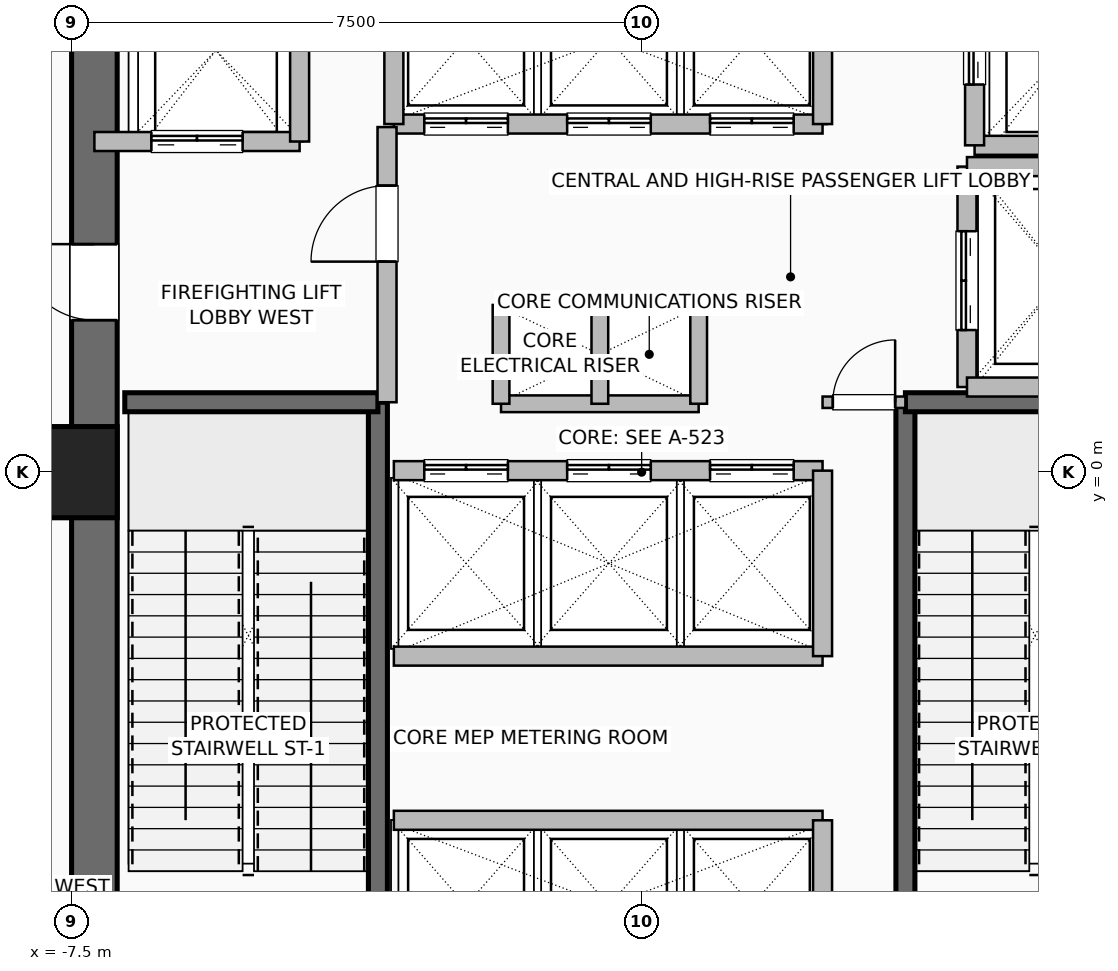
"""IFC4 building model, lengths in metres.
Left out: names, types, materials, properties, quantities, classifications, styles, units other than length and angle.
Written with IfcOpenShell. Run it as: python <this file> out.ifc"""

import sys

from ifc_helpers import new_model, si_unit, direction, frame, frame_2d, origin, origin_2d, place, context, subcontext, project, spatial, rectangle, hollow_rectangle, extrude, element, fill, save


model = new_model("IFC4")
c1 = context("Model", 3, precision=1e-05, world=origin(), true_north=direction((0.0, 1.0)))
c2 = subcontext(c1, "Body", "Model", "MODEL_VIEW")
j1 = project(units=[si_unit("LENGTHUNIT", "METRE"), si_unit("PLANEANGLEUNIT", "RADIAN")], contexts=[c1])
p1 = place(None, origin())
s1 = spatial("IfcSite", under=j1, at=p1, CompositionType="ELEMENT")
p2 = place(p1, origin())
s2 = spatial("IfcBuilding", under=s1, at=p2, CompositionType="ELEMENT")
p3 = place(p2, frame((0.0, 0.0, 88.0)))
s3 = spatial("IfcBuildingStorey", under=s2, at=p3, CompositionType="ELEMENT", Elevation=88.0)
p4 = place(p3, frame((-7.5, 0.0, 0.0), z_axis=(0.0, 0.0, 1.0), x_axis=(1.0, 0.0, 0.0)))
e1 = element("IfcColumn", 1, at=p4, inside=s3, PredefinedType="COLUMN", context=c2, shape_type="SweptSolid", body=[
    extrude(hollow_rectangle(XDim=1.2, YDim=1.2, WallThickness=0.055, at=origin_2d()), origin(), (0.0, 0.0, 1.0), 6.0),
])
p5 = place(p3, frame((-7.2, -7.5, 0.0), z_axis=(0.0, 0.0, 1.0), x_axis=(0.0, 1.0, 0.0)))
e2 = element("IfcWall", 2, at=p5, inside=s3, PredefinedType="SHEAR", context=c2, shape_type="SweptSolid", body=[
    extrude(rectangle(XDim=15.0, YDim=0.6, at=frame_2d((7.5, 0.0))), origin(), (0.0, 0.0, 1.0), 5.6),
])
p6 = place(p5, frame((9.5, 0.0, 0.0)))
e3 = element("IfcOpeningElement", 3, at=p6, cuts=e2, PredefinedType="OPENING", context=c2, shape_type="SweptSolid", body=[
    extrude(rectangle(XDim=1.0, YDim=2.08, at=frame_2d((0.5, 1.04))), frame((0.0, 0.31, 0.0), z_axis=(0.0, -1.0, 0.0), x_axis=(1.0, 0.0, 0.0)), (0.0, 0.0, 1.0), 0.62),
])
p7 = place(p3, frame((-3.47, -6.8, 0.0), z_axis=(0.0, 0.0, 1.0), x_axis=(0.0, 1.0, 0.0)))
e4 = element("IfcWall", 4, at=p7, inside=s3, PredefinedType="SHEAR", context=c2, shape_type="SweptSolid", body=[
    extrude(rectangle(XDim=7.72, YDim=0.25, at=frame_2d((3.86, 0.0))), origin(), (0.0, 0.0, 1.0), 5.6),
])
p8 = place(p3, frame((-6.8, 0.92, 0.0), z_axis=(0.0, 0.0, 1.0), x_axis=(1.0, 0.0, 0.0)))
e5 = element("IfcWall", 5, at=p8, inside=s3, PredefinedType="SHEAR", context=c2, shape_type="SweptSolid", body=[
    extrude(rectangle(XDim=3.33, YDim=0.25, at=frame_2d((1.665, 0.0))), origin(), (0.0, 0.0, 1.0), 5.6),
])
p9 = place(p3, frame((3.47, -6.8, 0.0), z_axis=(0.0, 0.0, 1.0), x_axis=(0.0, 1.0, 0.0)))
e6 = element("IfcWall", 6, at=p9, inside=s3, PredefinedType="SHEAR", context=c2, shape_type="SweptSolid", body=[
    extrude(rectangle(XDim=7.72, YDim=0.25, at=frame_2d((3.86, 0.0))), origin(), (0.0, 0.0, 1.0), 5.6),
])
p10 = place(p3, frame((3.47, 0.92, 0.0), z_axis=(0.0, 0.0, 1.0), x_axis=(1.0, 0.0, 0.0)))
e7 = element("IfcWall", 7, at=p10, inside=s3, PredefinedType="SHEAR", context=c2, shape_type="SweptSolid", body=[
    extrude(rectangle(XDim=3.33, YDim=0.25, at=frame_2d((1.665, 0.0))), origin(), (0.0, 0.0, 1.0), 5.6),
])
for number, where, z_axis, x_axis in (
    (8, (-1.85, 2.2, 0.0), (0.0, 0.0, 1.0), (1.0, 0.0, 0.0)),
    (9, (-1.85, 0.9, 0.0), (0.0, 0.0, 1.0), (1.0, 0.0, 0.0)),
):
    element("IfcWall", number, at=place(p3, frame(where, z_axis=z_axis, x_axis=x_axis)), inside=s3, PredefinedType="PARTITIONING", context=c2, shape_type="SweptSolid", body=[
        extrude(rectangle(XDim=2.6, YDim=0.22, at=frame_2d((1.3, 0.0))), origin(), (0.0, 0.0, 1.0), 5.6),
    ])
for number, where, z_axis, x_axis in (
    (10, (-0.55, 0.9, 0.0), (0.0, 0.0, 1.0), (0.0, 1.0, 0.0)),
    (11, (0.75, 0.9, 0.0), (0.0, 0.0, 1.0), (0.0, 1.0, 0.0)),
    (12, (-1.85, 0.9, 0.0), (0.0, 0.0, 1.0), (0.0, 1.0, 0.0)),
):
    element("IfcWall", number, at=place(p3, frame(where, z_axis=z_axis, x_axis=x_axis)), inside=s3, PredefinedType="PARTITIONING", context=c2, shape_type="SweptSolid", body=[
        extrude(rectangle(XDim=1.3, YDim=0.22, at=frame_2d((0.65, 0.0))), origin(), (0.0, 0.0, 1.0), 5.6),
    ])
p11 = place(p3, frame((-3.26, -4.58, 0.0), z_axis=(0.0, 0.0, 1.0), x_axis=(1.0, 0.0, 0.0)))
e13 = element("IfcWall", 13, at=p11, inside=s3, PredefinedType="SHEAR", context=c2, shape_type="SweptSolid", body=[
    extrude(rectangle(XDim=5.64, YDim=0.25, at=frame_2d((2.82, 0.0))), origin(), (0.0, 0.0, 1.0), 5.6),
])
p12 = place(p3, frame((2.38, -6.8, 0.0), z_axis=(0.0, 0.0, 1.0), x_axis=(0.0, 1.0, 0.0)))
e14 = element("IfcWall", 14, at=p12, inside=s3, PredefinedType="SHEAR", context=c2, shape_type="SweptSolid", body=[
    extrude(rectangle(XDim=2.22, YDim=0.25, at=frame_2d((1.11, 0.0))), origin(), (0.0, 0.0, 1.0), 5.6),
])
p13 = place(p3, frame((-3.26, 0.02, 0.0), z_axis=(0.0, 0.0, 1.0), x_axis=(1.0, 0.0, 0.0)))
e15 = element("IfcWall", 15, at=p13, inside=s3, PredefinedType="SHEAR", context=c2, shape_type="SweptSolid", body=[
    extrude(rectangle(XDim=5.64, YDim=0.25, at=frame_2d((2.82, 0.0))), origin(), (0.0, 0.0, 1.0), 5.6),
])
p14 = place(p13, frame((0.4, 0.0, 0.0)))
e16 = element("IfcOpeningElement", 16, at=p14, cuts=e15, PredefinedType="OPENING", context=c2, shape_type="SweptSolid", body=[
    extrude(rectangle(XDim=1.1, YDim=2.2, at=frame_2d((0.55, 1.1))), frame((0.0, 0.135, 0.0), z_axis=(0.0, -1.0, 0.0), x_axis=(1.0, 0.0, 0.0)), (0.0, 0.0, 1.0), 0.27),
])
p15 = place(p13, frame((2.28, 0.0, 0.0)))
e17 = element("IfcOpeningElement", 17, at=p15, cuts=e15, PredefinedType="OPENING", context=c2, shape_type="SweptSolid", body=[
    extrude(rectangle(XDim=1.1, YDim=2.2, at=frame_2d((0.55, 1.1))), frame((0.0, 0.135, 0.0), z_axis=(0.0, -1.0, 0.0), x_axis=(1.0, 0.0, 0.0)), (0.0, 0.0, 1.0), 0.27),
])
p16 = place(p13, frame((4.16, 0.0, 0.0)))
e18 = element("IfcOpeningElement", 18, at=p16, cuts=e15, PredefinedType="OPENING", context=c2, shape_type="SweptSolid", body=[
    extrude(rectangle(XDim=1.1, YDim=2.2, at=frame_2d((0.55, 1.1))), frame((0.0, 0.135, 0.0), z_axis=(0.0, -1.0, 0.0), x_axis=(1.0, 0.0, 0.0)), (0.0, 0.0, 1.0), 0.27),
])
p17 = place(p3, frame((-3.26, -2.42, 0.0), z_axis=(0.0, 0.0, 1.0), x_axis=(1.0, 0.0, 0.0)))
e19 = element("IfcWall", 19, at=p17, inside=s3, PredefinedType="SHEAR", context=c2, shape_type="SweptSolid", body=[
    extrude(rectangle(XDim=5.64, YDim=0.25, at=frame_2d((2.82, 0.0))), origin(), (0.0, 0.0, 1.0), 5.6),
])
p18 = place(p3, frame((2.38, -2.42, 0.0), z_axis=(0.0, 0.0, 1.0), x_axis=(0.0, 1.0, 0.0)))
e20 = element("IfcWall", 20, at=p18, inside=s3, PredefinedType="SHEAR", context=c2, shape_type="SweptSolid", body=[
    extrude(rectangle(XDim=2.44, YDim=0.25, at=frame_2d((1.22, 0.0))), origin(), (0.0, 0.0, 1.0), 5.6),
])
p19 = place(p3, frame((-3.26, 4.58, 0.0), z_axis=(0.0, 0.0, 1.0), x_axis=(1.0, 0.0, 0.0)))
e21 = element("IfcWall", 21, at=p19, inside=s3, PredefinedType="SHEAR", context=c2, shape_type="SweptSolid", body=[
    extrude(rectangle(XDim=5.64, YDim=0.25, at=frame_2d((2.82, 0.0))), origin(), (0.0, 0.0, 1.0), 5.6),
])
p20 = place(p19, frame((0.4, 0.0, 0.0)))
e22 = element("IfcOpeningElement", 22, at=p20, cuts=e21, PredefinedType="OPENING", context=c2, shape_type="SweptSolid", body=[
    extrude(rectangle(XDim=1.1, YDim=2.2, at=frame_2d((0.55, 1.1))), frame((0.0, 0.135, 0.0), z_axis=(0.0, -1.0, 0.0), x_axis=(1.0, 0.0, 0.0)), (0.0, 0.0, 1.0), 0.27),
])
p21 = place(p19, frame((2.28, 0.0, 0.0)))
e23 = element("IfcOpeningElement", 23, at=p21, cuts=e21, PredefinedType="OPENING", context=c2, shape_type="SweptSolid", body=[
    extrude(rectangle(XDim=1.1, YDim=2.2, at=frame_2d((0.55, 1.1))), frame((0.0, 0.135, 0.0), z_axis=(0.0, -1.0, 0.0), x_axis=(1.0, 0.0, 0.0)), (0.0, 0.0, 1.0), 0.27),
])
p22 = place(p19, frame((4.16, 0.0, 0.0)))
e24 = element("IfcOpeningElement", 24, at=p22, cuts=e21, PredefinedType="OPENING", context=c2, shape_type="SweptSolid", body=[
    extrude(rectangle(XDim=1.1, YDim=2.2, at=frame_2d((0.55, 1.1))), frame((0.0, 0.135, 0.0), z_axis=(0.0, -1.0, 0.0), x_axis=(1.0, 0.0, 0.0)), (0.0, 0.0, 1.0), 0.27),
])
for number, where, z_axis, x_axis in (
    (25, (-3.26, 4.58, 0.0), (0.0, 0.0, 1.0), (0.0, 1.0, 0.0)),
    (26, (2.38, 4.58, 0.0), (0.0, 0.0, 1.0), (0.0, 1.0, 0.0)),
):
    element("IfcWall", number, at=place(p3, frame(where, z_axis=z_axis, x_axis=x_axis)), inside=s3, PredefinedType="SHEAR", context=c2, shape_type="SweptSolid", body=[
        extrude(rectangle(XDim=2.22, YDim=0.25, at=frame_2d((1.11, 0.0))), origin(), (0.0, 0.0, 1.0), 5.6),
    ])
p23 = place(p3, frame((-7.2, 4.35, 0.0), z_axis=(0.0, 0.0, 1.0), x_axis=(1.0, 0.0, 0.0)))
e27 = element("IfcWall", 27, at=p23, inside=s3, PredefinedType="SHEAR", context=c2, shape_type="SweptSolid", body=[
    extrude(rectangle(XDim=2.7, YDim=0.25, at=frame_2d((1.35, 0.0))), origin(), (0.0, 0.0, 1.0), 5.6),
])
p24 = place(p23, frame((0.75, 0.0, 0.0)))
e28 = element("IfcOpeningElement", 28, at=p24, cuts=e27, PredefinedType="OPENING", context=c2, shape_type="SweptSolid", body=[
    extrude(rectangle(XDim=1.2, YDim=2.2, at=frame_2d((0.6, 1.1))), frame((0.0, 0.135, 0.0), z_axis=(0.0, -1.0, 0.0), x_axis=(1.0, 0.0, 0.0)), (0.0, 0.0, 1.0), 0.27),
])
p25 = place(p3, frame((-4.5, 4.35, 0.0), z_axis=(0.0, 0.0, 1.0), x_axis=(0.0, 1.0, 0.0)))
e29 = element("IfcWall", 29, at=p25, inside=s3, PredefinedType="SHEAR", context=c2, shape_type="SweptSolid", body=[
    extrude(rectangle(XDim=2.85, YDim=0.25, at=frame_2d((1.425, 0.0))), origin(), (0.0, 0.0, 1.0), 5.6),
])
p26 = place(p3, frame((4.38, 4.3, 0.0), z_axis=(0.0, 0.0, 1.0), x_axis=(1.0, 0.0, 0.0)))
e30 = element("IfcWall", 30, at=p26, inside=s3, PredefinedType="SHEAR", context=c2, shape_type="SweptSolid", body=[
    extrude(rectangle(XDim=2.42, YDim=0.25, at=frame_2d((1.21, 0.0))), origin(), (0.0, 0.0, 1.0), 5.6),
])
p27 = place(p3, frame((4.38, 4.3, 0.0), z_axis=(0.0, 0.0, 1.0), x_axis=(0.0, 1.0, 0.0)))
e31 = element("IfcWall", 31, at=p27, inside=s3, PredefinedType="SHEAR", context=c2, shape_type="SweptSolid", body=[
    extrude(rectangle(XDim=2.5, YDim=0.25, at=frame_2d((1.25, 0.0))), origin(), (0.0, 0.0, 1.0), 5.6),
])
p28 = place(p27, frame((0.8, 0.0, 0.0)))
e32 = element("IfcOpeningElement", 32, at=p28, cuts=e31, PredefinedType="OPENING", context=c2, shape_type="SweptSolid", body=[
    extrude(rectangle(XDim=1.2, YDim=2.2, at=frame_2d((0.6, 1.1))), frame((0.0, 0.135, 0.0), z_axis=(0.0, -1.0, 0.0), x_axis=(1.0, 0.0, 0.0)), (0.0, 0.0, 1.0), 0.27),
])
p29 = place(p3, frame((4.28, 1.12, 0.0), z_axis=(0.0, 0.0, 1.0), x_axis=(0.0, 1.0, 0.0)))
e33 = element("IfcWall", 33, at=p29, inside=s3, PredefinedType="SHEAR", context=c2, shape_type="SweptSolid", body=[
    extrude(rectangle(XDim=2.9, YDim=0.25, at=frame_2d((1.45, 0.0))), origin(), (0.0, 0.0, 1.0), 5.6),
])
p30 = place(p29, frame((0.75, 0.0, 0.0)))
e34 = element("IfcOpeningElement", 34, at=p30, cuts=e33, PredefinedType="OPENING", context=c2, shape_type="SweptSolid", body=[
    extrude(rectangle(XDim=1.3, YDim=2.3, at=frame_2d((0.65, 1.15))), frame((0.0, 0.135, 0.0), z_axis=(0.0, -1.0, 0.0), x_axis=(1.0, 0.0, 0.0)), (0.0, 0.0, 1.0), 0.27),
])
for number, where, z_axis, x_axis in (
    (35, (4.28, 1.12, 0.0), (0.0, 0.0, 1.0), (1.0, 0.0, 0.0)),
    (36, (4.28, 4.02, 0.0), (0.0, 0.0, 1.0), (1.0, 0.0, 0.0)),
):
    element("IfcWall", number, at=place(p3, frame(where, z_axis=z_axis, x_axis=x_axis)), inside=s3, PredefinedType="SHEAR", context=c2, shape_type="SweptSolid", body=[
        extrude(rectangle(XDim=2.52, YDim=0.25, at=frame_2d((1.26, 0.0))), origin(), (0.0, 0.0, 1.0), 5.6),
    ])
p31 = place(p3, frame((-3.35, 0.92, 0.0), z_axis=(0.0, 0.0, 1.0), x_axis=(0.0, 1.0, 0.0)))
e37 = element("IfcWall", 37, at=p31, inside=s3, PredefinedType="SHEAR", context=c2, shape_type="SweptSolid", body=[
    extrude(rectangle(XDim=3.62, YDim=0.25, at=frame_2d((1.81, 0.0))), origin(), (0.0, 0.0, 1.0), 5.6),
])
p32 = place(p31, frame((1.85, 0.0, 0.0)))
e38 = element("IfcOpeningElement", 38, at=p32, cuts=e37, PredefinedType="OPENING", context=c2, shape_type="SweptSolid", body=[
    extrude(rectangle(XDim=1.0, YDim=2.08, at=frame_2d((0.5, 1.04))), frame((0.0, 0.135, 0.0), z_axis=(0.0, -1.0, 0.0), x_axis=(1.0, 0.0, 0.0)), (0.0, 0.0, 1.0), 0.27),
])
p33 = place(p3, frame((2.38, 0.92, 0.0), z_axis=(0.0, 0.0, 1.0), x_axis=(1.0, 0.0, 0.0)))
e39 = element("IfcWall", 39, at=p33, inside=s3, PredefinedType="PARTITIONING", context=c2, shape_type="SweptSolid", body=[
    extrude(rectangle(XDim=1.09, YDim=0.15, at=frame_2d((0.545, 0.0))), origin(), (0.0, 0.0, 1.0), 5.6),
])
p34 = place(p33, frame((0.135, 0.0, 0.0)))
e40 = element("IfcOpeningElement", 40, at=p34, cuts=e39, PredefinedType="OPENING", context=c2, shape_type="SweptSolid", body=[
    extrude(rectangle(XDim=0.82, YDim=2.05, at=frame_2d((0.41, 1.025))), frame((0.0, 0.085, 0.0), z_axis=(0.0, -1.0, 0.0), x_axis=(1.0, 0.0, 0.0)), (0.0, 0.0, 1.0), 0.17),
])
p35 = place(p6, origin())
e41 = element("IfcDoor", 41, at=p35, inside=s3, OperationType="SINGLE_SWING_RIGHT", PredefinedType="DOOR", context=c2, shape_type="SweptSolid", body=[
    extrude(rectangle(XDim=1.0, YDim=2.08, at=frame_2d((0.5, 1.04))), frame((0.0, 0.025, 0.0), z_axis=(0.0, -1.0, 0.0), x_axis=(1.0, 0.0, 0.0)), (0.0, 0.0, 1.0), 0.05),
])
fill(e3, e41)
p36 = place(p14, origin())
e42 = element("IfcDoor", 42, at=p36, inside=s3, OperationType="DOUBLE_DOOR_SLIDING", PredefinedType="DOOR", context=c2, shape_type="SweptSolid", body=[
    extrude(rectangle(XDim=1.1, YDim=2.2, at=frame_2d((0.55, 1.1))), frame((0.0, 0.025, 0.0), z_axis=(0.0, -1.0, 0.0), x_axis=(1.0, 0.0, 0.0)), (0.0, 0.0, 1.0), 0.05),
])
fill(e16, e42)
p37 = place(p15, origin())
e43 = element("IfcDoor", 43, at=p37, inside=s3, OperationType="DOUBLE_DOOR_SLIDING", PredefinedType="DOOR", context=c2, shape_type="SweptSolid", body=[
    extrude(rectangle(XDim=1.1, YDim=2.2, at=frame_2d((0.55, 1.1))), frame((0.0, 0.025, 0.0), z_axis=(0.0, -1.0, 0.0), x_axis=(1.0, 0.0, 0.0)), (0.0, 0.0, 1.0), 0.05),
])
fill(e17, e43)
p38 = place(p16, origin())
e44 = element("IfcDoor", 44, at=p38, inside=s3, OperationType="DOUBLE_DOOR_SLIDING", PredefinedType="DOOR", context=c2, shape_type="SweptSolid", body=[
    extrude(rectangle(XDim=1.1, YDim=2.2, at=frame_2d((0.55, 1.1))), frame((0.0, 0.025, 0.0), z_axis=(0.0, -1.0, 0.0), x_axis=(1.0, 0.0, 0.0)), (0.0, 0.0, 1.0), 0.05),
])
fill(e18, e44)
p39 = place(p20, origin())
e45 = element("IfcDoor", 45, at=p39, inside=s3, OperationType="DOUBLE_DOOR_SLIDING", PredefinedType="DOOR", context=c2, shape_type="SweptSolid", body=[
    extrude(rectangle(XDim=1.1, YDim=2.2, at=frame_2d((0.55, 1.1))), frame((0.0, 0.025, 0.0), z_axis=(0.0, -1.0, 0.0), x_axis=(1.0, 0.0, 0.0)), (0.0, 0.0, 1.0), 0.05),
])
fill(e22, e45)
p40 = place(p21, origin())
e46 = element("IfcDoor", 46, at=p40, inside=s3, OperationType="DOUBLE_DOOR_SLIDING", PredefinedType="DOOR", context=c2, shape_type="SweptSolid", body=[
    extrude(rectangle(XDim=1.1, YDim=2.2, at=frame_2d((0.55, 1.1))), frame((0.0, 0.025, 0.0), z_axis=(0.0, -1.0, 0.0), x_axis=(1.0, 0.0, 0.0)), (0.0, 0.0, 1.0), 0.05),
])
fill(e23, e46)
p41 = place(p22, origin())
e47 = element("IfcDoor", 47, at=p41, inside=s3, OperationType="DOUBLE_DOOR_SLIDING", PredefinedType="DOOR", context=c2, shape_type="SweptSolid", body=[
    extrude(rectangle(XDim=1.1, YDim=2.2, at=frame_2d((0.55, 1.1))), frame((0.0, 0.025, 0.0), z_axis=(0.0, -1.0, 0.0), x_axis=(1.0, 0.0, 0.0)), (0.0, 0.0, 1.0), 0.05),
])
fill(e24, e47)
p42 = place(p24, origin())
e48 = element("IfcDoor", 48, at=p42, inside=s3, OperationType="DOUBLE_DOOR_SLIDING", PredefinedType="DOOR", context=c2, shape_type="SweptSolid", body=[
    extrude(rectangle(XDim=1.2, YDim=2.2, at=frame_2d((0.6, 1.1))), frame((0.0, 0.025, 0.0), z_axis=(0.0, -1.0, 0.0), x_axis=(1.0, 0.0, 0.0)), (0.0, 0.0, 1.0), 0.05),
])
fill(e28, e48)
p43 = place(p28, origin())
e49 = element("IfcDoor", 49, at=p43, inside=s3, OperationType="DOUBLE_DOOR_SLIDING", PredefinedType="DOOR", context=c2, shape_type="SweptSolid", body=[
    extrude(rectangle(XDim=1.2, YDim=2.2, at=frame_2d((0.6, 1.1))), frame((0.0, 0.025, 0.0), z_axis=(0.0, -1.0, 0.0), x_axis=(1.0, 0.0, 0.0)), (0.0, 0.0, 1.0), 0.05),
])
fill(e32, e49)
p44 = place(p30, origin())
e50 = element("IfcDoor", 50, at=p44, inside=s3, OperationType="DOUBLE_DOOR_SLIDING", PredefinedType="DOOR", context=c2, shape_type="SweptSolid", body=[
    extrude(rectangle(XDim=1.3, YDim=2.3, at=frame_2d((0.65, 1.15))), frame((0.0, 0.025, 0.0), z_axis=(0.0, -1.0, 0.0), x_axis=(1.0, 0.0, 0.0)), (0.0, 0.0, 1.0), 0.05),
])
fill(e34, e50)
p45 = place(p32, origin())
e51 = element("IfcDoor", 51, at=p45, inside=s3, OperationType="SINGLE_SWING_LEFT", PredefinedType="DOOR", context=c2, shape_type="SweptSolid", body=[
    extrude(rectangle(XDim=1.0, YDim=2.08, at=frame_2d((0.5, 1.04))), frame((0.0, 0.025, 0.0), z_axis=(0.0, -1.0, 0.0), x_axis=(1.0, 0.0, 0.0)), (0.0, 0.0, 1.0), 0.05),
])
fill(e38, e51)
p46 = place(p34, origin())
e52 = element("IfcDoor", 52, at=p46, inside=s3, OperationType="SINGLE_SWING_RIGHT", PredefinedType="DOOR", context=c2, shape_type="SweptSolid", body=[
    extrude(rectangle(XDim=0.82, YDim=2.05, at=frame_2d((0.41, 1.025))), frame((0.0, 0.025, 0.0), z_axis=(0.0, -1.0, 0.0), x_axis=(1.0, 0.0, 0.0)), (0.0, 0.0, 1.0), 0.05),
])
fill(e40, e52)
save(model, sys.argv[1])
